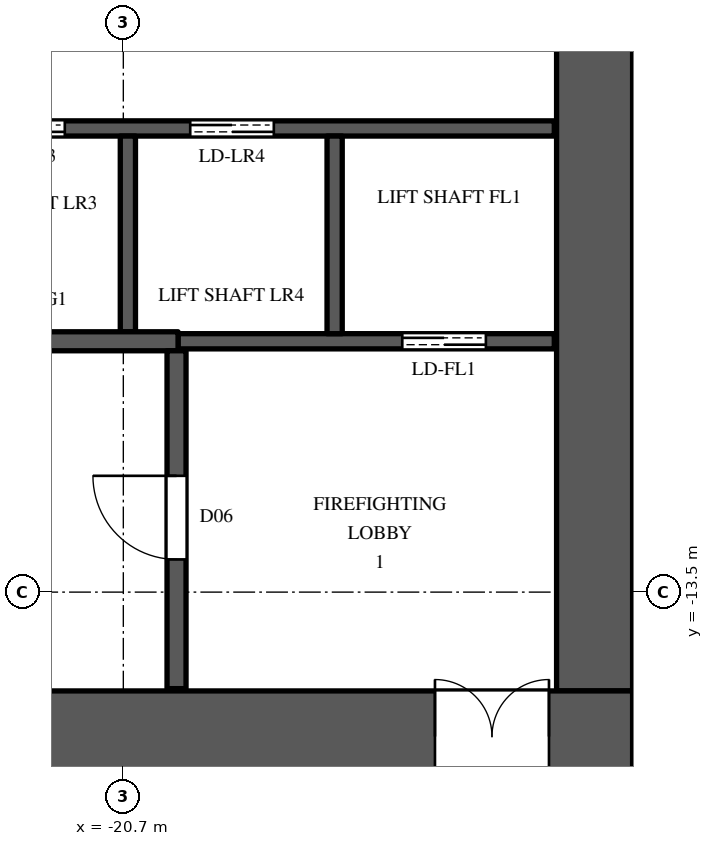
"""IFC4 building model, lengths in metres.
Left out: names, types, materials, properties, quantities, classifications, styles, units other than length and angle.
Written with IfcOpenShell. Run it as: python <this file> out.ifc"""

import sys

from ifc_helpers import new_model, si_unit, direction, frame, frame_2d, origin, place, context, subcontext, project, spatial, rectangle, extrude, element, fill, save


model = new_model("IFC4")
c1 = context("Model", 3, precision=1e-05, world=origin(), true_north=direction((0.0, 1.0)))
c2 = subcontext(c1, "Body", "Model", "MODEL_VIEW")
j1 = project(units=[si_unit("LENGTHUNIT", "METRE"), si_unit("PLANEANGLEUNIT", "RADIAN")], contexts=[c1])
p1 = place(None, origin())
s1 = spatial("IfcSite", under=j1, at=p1, CompositionType="ELEMENT")
p2 = place(p1, origin())
s2 = spatial("IfcBuilding", under=s1, at=p2, CompositionType="ELEMENT")
p3 = place(p2, frame((0.0, 0.0, 80.7)))
s3 = spatial("IfcBuildingStorey", under=s2, at=p3, CompositionType="ELEMENT", Elevation=80.7)
p4 = place(p3, frame((-30.0, -15.4, 0.0), z_axis=(0.0, 0.0, 1.0), x_axis=(1.0, 0.0, 0.0)))
e1 = element("IfcWall", 1, at=p4, inside=s3, PredefinedType="SHEAR", context=c2, shape_type="SweptSolid", body=[
    extrude(rectangle(XDim=16.0, YDim=1.2, at=frame_2d((8.0, 0.0))), origin(), (0.0, 0.0, 1.0), 3.6),
])
p5 = place(p4, frame((13.4, 0.0, 0.0)))
e2 = element("IfcOpeningElement", 2, at=p5, cuts=e1, PredefinedType="OPENING", context=c2, shape_type="SweptSolid", body=[
    extrude(rectangle(XDim=1.5, YDim=2.4, at=frame_2d((0.75, 1.2))), frame((0.0, 0.61, 0.0), z_axis=(0.0, -1.0, 0.0), x_axis=(1.0, 0.0, 0.0)), (0.0, 0.0, 1.0), 1.22),
])
p6 = place(p3, frame((-14.5, -14.8, 0.0), z_axis=(0.0, 0.0, 1.0), x_axis=(0.0, 1.0, 0.0)))
e3 = element("IfcWall", 3, at=p6, inside=s3, PredefinedType="SHEAR", context=c2, shape_type="SweptSolid", body=[
    extrude(rectangle(XDim=29.6, YDim=1.0, at=frame_2d((14.8, 0.0))), origin(), (0.0, 0.0, 1.0), 3.6),
])
p7 = place(p6, frame((8.45, 0.0, 0.0)))
e4 = element("IfcOpeningElement", 4, at=p7, cuts=e3, PredefinedType="OPENING", context=c2, shape_type="SweptSolid", body=[
    extrude(rectangle(XDim=1.5, YDim=2.4, at=frame_2d((0.75, 1.2))), frame((0.0, 0.51, 0.0), z_axis=(0.0, -1.0, 0.0), x_axis=(1.0, 0.0, 0.0)), (0.0, 0.0, 1.0), 1.02),
])
p8 = place(p6, frame((19.65, 0.0, 0.0)))
e5 = element("IfcOpeningElement", 5, at=p8, cuts=e3, PredefinedType="OPENING", context=c2, shape_type="SweptSolid", body=[
    extrude(rectangle(XDim=1.5, YDim=2.4, at=frame_2d((0.75, 1.2))), frame((0.0, 0.51, 0.0), z_axis=(0.0, -1.0, 0.0), x_axis=(1.0, 0.0, 0.0)), (0.0, 0.0, 1.0), 1.02),
])
p9 = place(p6, frame((14.5, 0.0, 0.0)))
e6 = element("IfcOpeningElement", 6, at=p9, cuts=e3, PredefinedType="OPENING", context=c2, shape_type="SweptSolid", body=[
    extrude(rectangle(XDim=0.6, YDim=2.0, at=frame_2d((0.3, 1.0))), frame((0.0, 0.51, 0.0), z_axis=(0.0, -1.0, 0.0), x_axis=(1.0, 0.0, 0.0)), (0.0, 0.0, 1.0), 1.02),
])
p10 = place(p3, frame((-28.97, -7.4, 0.0), z_axis=(0.0, 0.0, 1.0), x_axis=(1.0, 0.0, 0.0)))
e7 = element("IfcWall", 7, at=p10, inside=s3, PredefinedType="SHEAR", context=c2, shape_type="SweptSolid", body=[
    extrude(rectangle(XDim=13.94, YDim=0.2, at=frame_2d((6.97, 0.0))), origin(), (0.0, 0.0, 1.0), 3.3),
])
p11 = place(p10, frame((0.9, 0.0, 0.0)))
e8 = element("IfcOpeningElement", 8, at=p11, cuts=e7, PredefinedType="OPENING", context=c2, shape_type="SweptSolid", body=[
    extrude(rectangle(XDim=1.1, YDim=2.2, at=frame_2d((0.55, 1.1))), frame((0.0, 0.11, 0.0), z_axis=(0.0, -1.0, 0.0), x_axis=(1.0, 0.0, 0.0)), (0.0, 0.0, 1.0), 0.22),
])
p12 = place(p10, frame((3.7, 0.0, 0.0)))
e9 = element("IfcOpeningElement", 9, at=p12, cuts=e7, PredefinedType="OPENING", context=c2, shape_type="SweptSolid", body=[
    extrude(rectangle(XDim=1.1, YDim=2.2, at=frame_2d((0.55, 1.1))), frame((0.0, 0.11, 0.0), z_axis=(0.0, -1.0, 0.0), x_axis=(1.0, 0.0, 0.0)), (0.0, 0.0, 1.0), 0.22),
])
p13 = place(p10, frame((6.4, 0.0, 0.0)))
e10 = element("IfcOpeningElement", 10, at=p13, cuts=e7, PredefinedType="OPENING", context=c2, shape_type="SweptSolid", body=[
    extrude(rectangle(XDim=1.1, YDim=2.2, at=frame_2d((0.55, 1.1))), frame((0.0, 0.11, 0.0), z_axis=(0.0, -1.0, 0.0), x_axis=(1.0, 0.0, 0.0)), (0.0, 0.0, 1.0), 0.22),
])
p14 = place(p10, frame((9.15, 0.0, 0.0)))
e11 = element("IfcOpeningElement", 11, at=p14, cuts=e7, PredefinedType="OPENING", context=c2, shape_type="SweptSolid", body=[
    extrude(rectangle(XDim=1.1, YDim=2.2, at=frame_2d((0.55, 1.1))), frame((0.0, 0.11, 0.0), z_axis=(0.0, -1.0, 0.0), x_axis=(1.0, 0.0, 0.0)), (0.0, 0.0, 1.0), 0.22),
])
p15 = place(p3, frame((-20.64, -10.075, 0.0), z_axis=(0.0, 0.0, 1.0), x_axis=(0.0, 1.0, 0.0)))
e12 = element("IfcWall", 12, at=p15, inside=s3, PredefinedType="SHEAR", context=c2, shape_type="SweptSolid", body=[
    extrude(rectangle(XDim=2.575, YDim=0.2, at=frame_2d((1.288, 0.0))), origin(), (0.0, 0.0, 1.0), 3.6),
])
p16 = place(p3, frame((-19.98, -10.2, 0.0), z_axis=(0.0, 0.0, 1.0), x_axis=(1.0, 0.0, 0.0)))
e13 = element("IfcWall", 13, at=p16, inside=s3, PredefinedType="SHEAR", context=c2, shape_type="SweptSolid", body=[
    extrude(rectangle(XDim=4.95, YDim=0.2, at=frame_2d((2.475, 0.0))), origin(), (0.0, 0.0, 1.0), 3.3),
])
p17 = place(p16, frame((2.95, 0.0, 0.0)))
e14 = element("IfcOpeningElement", 14, at=p17, cuts=e13, PredefinedType="OPENING", context=c2, shape_type="SweptSolid", body=[
    extrude(rectangle(XDim=1.1, YDim=2.2, at=frame_2d((0.55, 1.1))), frame((0.0, 0.11, 0.0), z_axis=(0.0, -1.0, 0.0), x_axis=(1.0, 0.0, 0.0)), (0.0, 0.0, 1.0), 0.22),
])
p18 = place(p3, frame((-17.92, -10.1, 0.0), z_axis=(0.0, 0.0, 1.0), x_axis=(0.0, 1.0, 0.0)))
e15 = element("IfcWall", 15, at=p18, inside=s3, PredefinedType="SHEAR", context=c2, shape_type="SweptSolid", body=[
    extrude(rectangle(XDim=2.6, YDim=0.2, at=frame_2d((1.3, 0.0))), origin(), (0.0, 0.0, 1.0), 3.6),
])
p19 = place(p3, frame((-28.81, -10.2, 0.0), z_axis=(0.0, 0.0, 1.0), x_axis=(1.0, 0.0, 0.0)))
e16 = element("IfcWall", 16, at=p19, inside=s3, PredefinedType="SHEAR", context=c2, shape_type="SweptSolid", body=[
    extrude(rectangle(XDim=8.83, YDim=0.25, at=frame_2d((4.415, 0.0))), origin(), (0.0, 0.0, 1.0), 3.3),
])
p20 = place(p3, frame((-20.0, -14.77, 0.0), z_axis=(0.0, 0.0, 1.0), x_axis=(0.0, 1.0, 0.0)))
e17 = element("IfcWall", 17, at=p20, inside=s3, PredefinedType="SHEAR", context=c2, shape_type="SweptSolid", body=[
    extrude(rectangle(XDim=4.445, YDim=0.25, at=frame_2d((2.223, 0.0))), origin(), (0.0, 0.0, 1.0), 3.3),
])
p21 = place(p20, frame((1.7, 0.0, 0.0)))
e18 = element("IfcOpeningElement", 18, at=p21, cuts=e17, PredefinedType="OPENING", context=c2, shape_type="SweptSolid", body=[
    extrude(rectangle(XDim=1.1, YDim=2.2, at=frame_2d((0.55, 1.1))), frame((0.0, 0.135, 0.0), z_axis=(0.0, -1.0, 0.0), x_axis=(1.0, 0.0, 0.0)), (0.0, 0.0, 1.0), 0.27),
])
p22 = place(p21, origin())
e19 = element("IfcDoor", 19, at=p22, inside=s3, OperationType="SINGLE_SWING_RIGHT", PredefinedType="DOOR", context=c2, shape_type="SweptSolid", body=[
    extrude(rectangle(XDim=1.1, YDim=2.2, at=frame_2d((0.55, 1.1))), frame((0.0, 0.025, 0.0), z_axis=(0.0, -1.0, 0.0), x_axis=(1.0, 0.0, 0.0)), (0.0, 0.0, 1.0), 0.05),
])
fill(e18, e19)
p23 = place(p13, origin())
e20 = element("IfcDoor", 20, at=p23, inside=s3, OperationType="DOUBLE_DOOR_SLIDING", PredefinedType="DOOR", context=c2, shape_type="SweptSolid", body=[
    extrude(rectangle(XDim=1.1, YDim=2.2, at=frame_2d((0.55, 1.1))), frame((0.0, 0.025, 0.0), z_axis=(0.0, -1.0, 0.0), x_axis=(1.0, 0.0, 0.0)), (0.0, 0.0, 1.0), 0.05),
])
fill(e10, e20)
p24 = place(p14, origin())
e21 = element("IfcDoor", 21, at=p24, inside=s3, OperationType="DOUBLE_DOOR_SLIDING", PredefinedType="DOOR", context=c2, shape_type="SweptSolid", body=[
    extrude(rectangle(XDim=1.1, YDim=2.2, at=frame_2d((0.55, 1.1))), frame((0.0, 0.025, 0.0), z_axis=(0.0, -1.0, 0.0), x_axis=(1.0, 0.0, 0.0)), (0.0, 0.0, 1.0), 0.05),
])
fill(e11, e21)
p25 = place(p17, origin())
e22 = element("IfcDoor", 22, at=p25, inside=s3, OperationType="DOUBLE_DOOR_SLIDING", PredefinedType="DOOR", context=c2, shape_type="SweptSolid", body=[
    extrude(rectangle(XDim=1.1, YDim=2.2, at=frame_2d((0.55, 1.1))), frame((0.0, 0.025, 0.0), z_axis=(0.0, -1.0, 0.0), x_axis=(1.0, 0.0, 0.0)), (0.0, 0.0, 1.0), 0.05),
])
fill(e14, e22)
p26 = place(p5, origin())
e23 = element("IfcDoor", 23, at=p26, inside=s3, OperationType="DOUBLE_DOOR_SINGLE_SWING", PredefinedType="DOOR", context=c2, shape_type="SweptSolid", body=[
    extrude(rectangle(XDim=1.5, YDim=2.4, at=frame_2d((0.75, 1.2))), frame((0.0, 0.025, 0.0), z_axis=(0.0, -1.0, 0.0), x_axis=(1.0, 0.0, 0.0)), (0.0, 0.0, 1.0), 0.05),
])
fill(e2, e23)
save(model, sys.argv[1])
